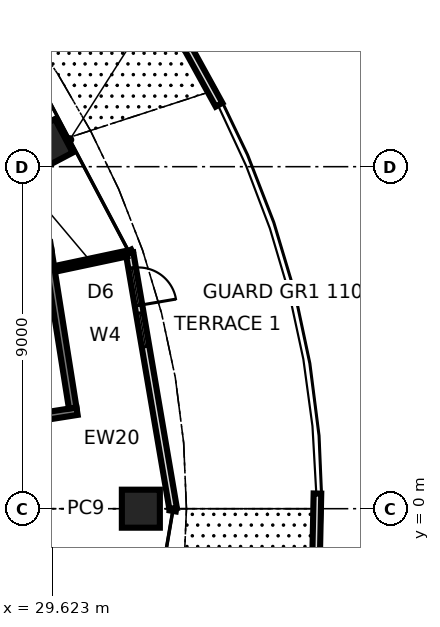
"""IFC4 building model, lengths in metres.
Left out: names, types, materials, properties, quantities, classifications, styles, units other than length and angle.
Written with IfcOpenShell. Run it as: python <this file> out.ifc"""

import sys

from ifc_helpers import new_model, si_unit, direction, frame, frame_2d, origin, origin_2d, place, context, subcontext, project, spatial, rectangle, extrude, element, fill, save


model = new_model("IFC4")
c1 = context("Model", 3, precision=1e-05, world=origin(), true_north=direction((0.0, 1.0)))
c2 = subcontext(c1, "Body", "Model", "MODEL_VIEW")
j1 = project(units=[si_unit("LENGTHUNIT", "METRE"), si_unit("PLANEANGLEUNIT", "RADIAN")], contexts=[c1])
p1 = place(None, origin())
s1 = spatial("IfcSite", under=j1, at=p1, CompositionType="ELEMENT")
p2 = place(p1, origin())
s2 = spatial("IfcBuilding", under=s1, at=p2, CompositionType="ELEMENT")
p3 = place(p2, frame((0.0, 0.0, 15.1)))
s3 = spatial("IfcBuildingStorey", under=s2, at=p3, CompositionType="ELEMENT", Elevation=15.1)
for number, where, z_axis, x_axis in (
    (1, (31.95, 0.0, 0.0), (0.0, 0.0, 1.0), (1.0, 0.0, 0.0)),
    (2, (29.482, 9.579, 0.0), (0.0, 0.0, 1.0), (0.884, 0.467, 0.0)),
):
    element("IfcColumn", number, at=place(p3, frame(where, z_axis=z_axis, x_axis=x_axis)), inside=s3, PredefinedType="COLUMN", context=c2, shape_type="SweptSolid", body=[
        extrude(rectangle(XDim=1.0, YDim=1.0, at=origin_2d()), origin(), (0.0, 0.0, 1.0), 4.5),
    ])
p4 = place(p3, frame((32.8, 0.0, 0.0), z_axis=(0.0, 0.0, 1.0), x_axis=(-0.168087065421, 0.98577215341, 0.0)))
e3 = element("IfcWall", 3, at=p4, inside=s3, PredefinedType="SOLIDWALL", context=c2, shape_type="SweptSolid", body=[
    extrude(rectangle(XDim=6.825, YDim=0.2, at=frame_2d((3.413, 0.0))), origin(), (0.0, 0.0, 1.0), 4.3),
])
p5 = place(p4, frame((5.425, 0.0, 0.0)))
e4 = element("IfcOpeningElement", 4, at=p5, cuts=e3, PredefinedType="OPENING", context=c2, shape_type="SweptSolid", body=[
    extrude(rectangle(XDim=1.0, YDim=2.4, at=frame_2d((0.5, 1.2))), frame((0.0, 0.11, 0.0), z_axis=(0.0, -1.0, 0.0), x_axis=(1.0, 0.0, 0.0)), (0.0, 0.0, 1.0), 0.22),
])
p6 = place(p4, frame((4.325, 0.0, 0.3)))
e5 = element("IfcOpeningElement", 5, at=p6, cuts=e3, PredefinedType="OPENING", context=c2, shape_type="SweptSolid", body=[
    extrude(rectangle(XDim=0.9, YDim=2.1, at=frame_2d((0.45, 1.05))), frame((0.0, 0.11, 0.0), z_axis=(0.0, -1.0, 0.0), x_axis=(1.0, 0.0, 0.0)), (0.0, 0.0, 1.0), 0.22),
])
p7 = place(p4, frame((5.425, 0.0, 2.7)))
e6 = element("IfcOpeningElement", 6, at=p7, cuts=e3, PredefinedType="OPENING", context=c2, shape_type="SweptSolid", body=[
    extrude(rectangle(XDim=1.0, YDim=0.6, at=frame_2d((0.5, 0.3))), frame((0.0, 0.11, 0.0), z_axis=(0.0, -1.0, 0.0), x_axis=(1.0, 0.0, 0.0)), (0.0, 0.0, 1.0), 0.22),
])
p8 = place(p3, frame((34.007, 10.629, 0.0), z_axis=(0.0, 0.0, 1.0), x_axis=(-0.482069852461, 0.876132785226, 0.0)))
e7 = element("IfcWall", 7, at=p8, inside=s3, PredefinedType="PARAPET", context=c2, shape_type="SweptSolid", body=[
    extrude(rectangle(XDim=1.737, YDim=0.2, at=frame_2d((0.868, 0.0))), origin(), (0.0, 0.0, 1.0), 1.1),
])
p9 = place(p3, frame((36.559, -1.359, 0.0), z_axis=(0.0, 0.0, 1.0), x_axis=(0.021251104192, 0.999774169786, 0.0)))
e8 = element("IfcWall", 8, at=p9, inside=s3, PredefinedType="PARAPET", context=c2, shape_type="SweptSolid", body=[
    extrude(rectangle(XDim=1.758, YDim=0.2, at=frame_2d((0.879, 0.0))), origin(), (0.0, 0.0, 1.0), 1.1),
])
p10 = place(p3, frame((29.679, 6.308, 0.0), z_axis=(0.0, 0.0, 1.0), x_axis=(0.978140280968, 0.20794612463, 0.0)))
e9 = element("IfcWall", 9, at=p10, inside=s3, PredefinedType="PARTITIONING", context=c2, shape_type="SweptSolid", body=[
    extrude(rectangle(XDim=1.938, YDim=0.15, at=frame_2d((0.969, 0.0))), origin(), (0.0, 0.0, 1.0), 4.3),
])
p11 = place(p3, frame((22.073, 1.269, 0.0), z_axis=(0.0, 0.0, 1.0), x_axis=(0.987684853285, 0.156456481465, 0.0)))
e10 = element("IfcWall", 10, at=p11, inside=s3, PredefinedType="SOLIDWALL", context=c2, shape_type="SweptSolid", body=[
    extrude(rectangle(XDim=8.3, YDim=0.2, at=frame_2d((4.15, 0.0))), origin(), (0.0, 0.0, 1.0), 4.25),
])
p12 = place(p3, frame((30.157, 2.65, 0.0), z_axis=(0.0, 0.0, 1.0), x_axis=(-0.156419245009, 0.987690751091, 0.0)))
e11 = element("IfcWall", 11, at=p12, inside=s3, PredefinedType="SOLIDWALL", context=c2, shape_type="SweptSolid", body=[
    extrude(rectangle(XDim=4.2, YDim=0.2, at=frame_2d((2.1, 0.0))), origin(), (0.0, 0.0, 1.0), 4.25),
])
p13 = place(p5, frame((1.0, 0.0, 0.0), z_axis=(0.0, 0.0, 1.0), x_axis=(-1.0, 0.0, 0.0)))
e12 = element("IfcDoor", 12, at=p13, inside=s3, OperationType="SINGLE_SWING_RIGHT", PredefinedType="DOOR", context=c2, shape_type="SweptSolid", body=[
    extrude(rectangle(XDim=1.0, YDim=2.4, at=frame_2d((0.5, 1.2))), frame((0.0, 0.025, 0.0), z_axis=(0.0, -1.0, 0.0), x_axis=(1.0, 0.0, 0.0)), (0.0, 0.0, 1.0), 0.05),
])
fill(e4, e12)
p14 = place(p6, origin())
e13 = element("IfcWindow", 13, at=p14, inside=s3, PartitioningType="SINGLE_PANEL", PredefinedType="WINDOW", context=c2, shape_type="SweptSolid", body=[
    extrude(rectangle(XDim=0.9, YDim=2.1, at=frame_2d((0.45, 1.05))), frame((0.0, 0.03, 0.0), z_axis=(0.0, -1.0, 0.0), x_axis=(1.0, 0.0, 0.0)), (0.0, 0.0, 1.0), 0.06),
])
fill(e5, e13)
p15 = place(p7, origin())
e14 = element("IfcWindow", 14, at=p15, inside=s3, PartitioningType="SINGLE_PANEL", PredefinedType="WINDOW", context=c2, shape_type="SweptSolid", body=[
    extrude(rectangle(XDim=1.0, YDim=0.6, at=frame_2d((0.5, 0.3))), frame((0.0, 0.03, 0.0), z_axis=(0.0, -1.0, 0.0), x_axis=(1.0, 0.0, 0.0)), (0.0, 0.0, 1.0), 0.06),
])
fill(e6, e14)
save(model, sys.argv[1])
